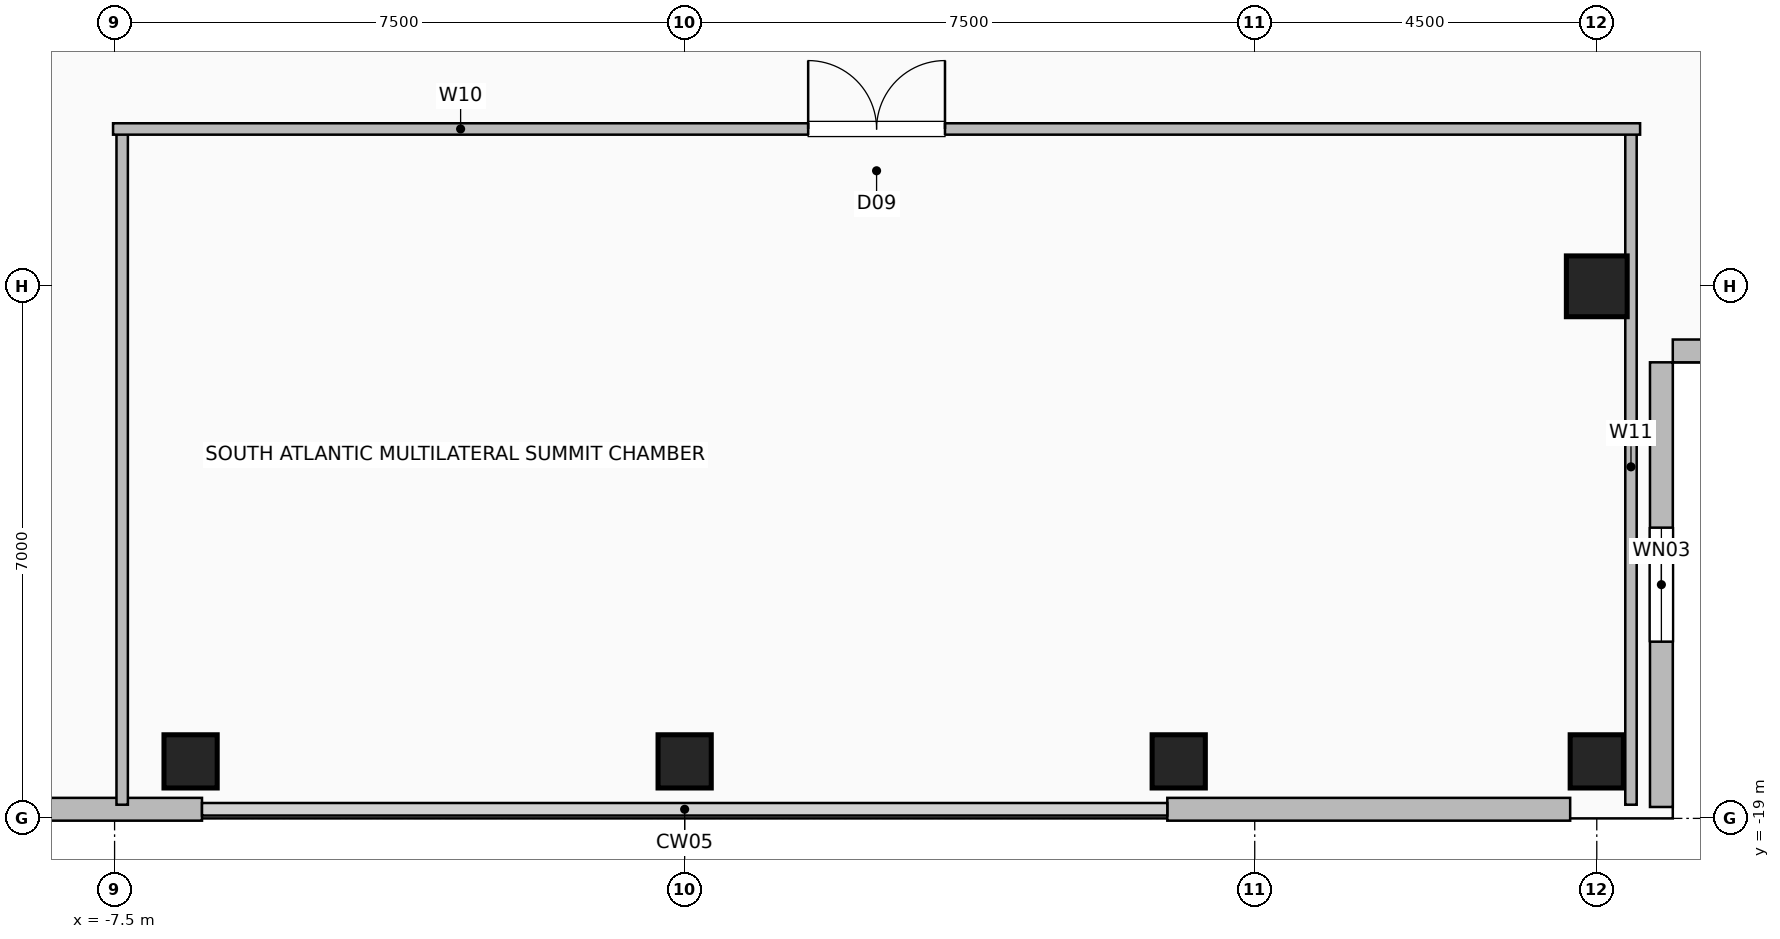
"""IFC4 building model, lengths in metres.
Left out: names, types, materials, properties, quantities, classifications, styles, units other than length and angle.
Written with IfcOpenShell. Run it as: python <this file> out.ifc"""

import sys

from ifc_helpers import new_model, si_unit, direction, frame, frame_2d, origin, origin_2d, place, context, subcontext, project, spatial, rectangle, hollow_rectangle, extrude, element, fill, save


model = new_model("IFC4")
c1 = context("Model", 3, precision=1e-05, world=origin(), true_north=direction((0.0, 1.0)))
c2 = subcontext(c1, "Body", "Model", "MODEL_VIEW")
j1 = project(units=[si_unit("LENGTHUNIT", "METRE"), si_unit("PLANEANGLEUNIT", "RADIAN")], contexts=[c1])
p1 = place(None, origin())
s1 = spatial("IfcSite", under=j1, at=p1, CompositionType="ELEMENT")
p2 = place(p1, origin())
s2 = spatial("IfcBuilding", under=s1, at=p2, CompositionType="ELEMENT")
p3 = place(p2, frame((0.0, 0.0, 246.8)))
s3 = spatial("IfcBuildingStorey", under=s2, at=p3, CompositionType="ELEMENT", Elevation=246.8)
for number, where, z_axis, x_axis in (
    (1, (-6.5, -18.25, 0.0), (0.0, 0.0, 1.0), (1.0, 0.0, 0.0)),
    (2, (0.0, -18.25, 0.0), (0.0, 0.0, 1.0), (1.0, 0.0, 0.0)),
    (3, (6.5, -18.25, 0.0), (0.0, 0.0, 1.0), (1.0, 0.0, 0.0)),
    (4, (12.0, -18.25, 0.0), (0.0, 0.0, 1.0), (1.0, 0.0, 0.0)),
):
    element("IfcColumn", number, at=place(p3, frame(where, z_axis=z_axis, x_axis=x_axis)), inside=s3, PredefinedType="COLUMN", context=c2, shape_type="SweptSolid", body=[
        extrude(hollow_rectangle(XDim=0.7, YDim=0.7, WallThickness=0.035, at=origin_2d()), origin(), (0.0, 0.0, 1.0), 3.6),
    ])
p4 = place(p3, frame((12.0, -12.0, 0.0), z_axis=(0.0, 0.0, 1.0), x_axis=(1.0, 0.0, 0.0)))
e5 = element("IfcColumn", 5, at=p4, inside=s3, PredefinedType="COLUMN", context=c2, shape_type="SweptSolid", body=[
    extrude(hollow_rectangle(XDim=0.8, YDim=0.8, WallThickness=0.04, at=origin_2d()), origin(), (0.0, 0.0, 1.0), 3.6),
])
for number, where, z_axis, x_axis in (
    (6, (-11.65, -18.88, 0.0), (0.0, 0.0, 1.0), (1.0, 0.0, 0.0)),
    (7, (6.35, -18.88, 0.0), (0.0, 0.0, 1.0), (1.0, 0.0, 0.0)),
):
    element("IfcWall", number, at=place(p3, frame(where, z_axis=z_axis, x_axis=x_axis)), inside=s3, PredefinedType="SOLIDWALL", context=c2, shape_type="SweptSolid", body=[
        extrude(rectangle(XDim=5.3, YDim=0.3, at=frame_2d((2.65, 0.0))), origin(), (0.0, 0.0, 1.0), 3.36),
    ])
p5 = place(p3, frame((12.85, -18.85, 0.0), z_axis=(0.0, 0.0, 1.0), x_axis=(0.0, 1.0, 0.0)))
e8 = element("IfcWall", 8, at=p5, inside=s3, PredefinedType="SOLIDWALL", context=c2, shape_type="SweptSolid", body=[
    extrude(rectangle(XDim=5.85, YDim=0.3, at=frame_2d((2.925, 0.0))), origin(), (0.0, 0.0, 1.0), 3.36),
])
p6 = place(p5, frame((2.175, 0.0, 0.9)))
e9 = element("IfcOpeningElement", 9, at=p6, cuts=e8, PredefinedType="OPENING", context=c2, shape_type="SweptSolid", body=[
    extrude(rectangle(XDim=1.5, YDim=1.8, at=frame_2d((0.75, 0.9))), frame((0.0, 0.16, 0.0), z_axis=(0.0, -1.0, 0.0), x_axis=(1.0, 0.0, 0.0)), (0.0, 0.0, 1.0), 0.32),
])
p7 = place(p3, frame((18.85, -12.85, 0.0), z_axis=(0.0, 0.0, 1.0), x_axis=(-1.0, 0.0, 0.0)))
e10 = element("IfcWall", 10, at=p7, inside=s3, PredefinedType="SOLIDWALL", context=c2, shape_type="SweptSolid", body=[
    extrude(rectangle(XDim=5.85, YDim=0.3, at=frame_2d((2.925, 0.0))), origin(), (0.0, 0.0, 1.0), 3.36),
])
for number, where, z_axis, x_axis in (
    (11, (-7.4, -18.82, 0.0), (0.0, 0.0, 1.0), (0.0, 1.0, 0.0)),
    (12, (12.45, -18.82, 0.0), (0.0, 0.0, 1.0), (0.0, 1.0, 0.0)),
):
    element("IfcWall", number, at=place(p3, frame(where, z_axis=z_axis, x_axis=x_axis)), inside=s3, PredefinedType="PARTITIONING", context=c2, shape_type="SweptSolid", body=[
        extrude(rectangle(XDim=8.89, YDim=0.15, at=frame_2d((4.445, 0.0))), origin(), (0.0, 0.0, 1.0), 3.36),
    ])
p8 = place(p3, frame((-7.52, -9.93, 0.0), z_axis=(0.0, 0.0, 1.0), x_axis=(1.0, 0.0, 0.0)))
e13 = element("IfcWall", 13, at=p8, inside=s3, PredefinedType="PARTITIONING", context=c2, shape_type="SweptSolid", body=[
    extrude(rectangle(XDim=20.09, YDim=0.15, at=frame_2d((10.045, 0.0))), origin(), (0.0, 0.0, 1.0), 3.36),
])
p9 = place(p8, frame((9.145, 0.0, 0.0)))
e14 = element("IfcOpeningElement", 14, at=p9, cuts=e13, PredefinedType="OPENING", context=c2, shape_type="SweptSolid", body=[
    extrude(rectangle(XDim=1.8, YDim=2.08, at=frame_2d((0.9, 1.04))), frame((0.0, 0.085, 0.0), z_axis=(0.0, -1.0, 0.0), x_axis=(1.0, 0.0, 0.0)), (0.0, 0.0, 1.0), 0.17),
])
p10 = place(p6, origin())
e15 = element("IfcWindow", 15, at=p10, inside=s3, PartitioningType="SINGLE_PANEL", PredefinedType="WINDOW", context=c2, shape_type="SweptSolid", body=[
    extrude(rectangle(XDim=1.5, YDim=1.8, at=frame_2d((0.75, 0.9))), frame((0.0, 0.03, 0.0), z_axis=(0.0, -1.0, 0.0), x_axis=(1.0, 0.0, 0.0)), (0.0, 0.0, 1.0), 0.06),
])
fill(e9, e15)
p11 = place(p9, origin())
e16 = element("IfcDoor", 16, at=p11, inside=s3, OperationType="DOUBLE_DOOR_SINGLE_SWING", PredefinedType="DOOR", context=c2, shape_type="SweptSolid", body=[
    extrude(rectangle(XDim=1.8, YDim=2.08, at=frame_2d((0.9, 1.04))), frame((0.0, 0.025, 0.0), z_axis=(0.0, -1.0, 0.0), x_axis=(1.0, 0.0, 0.0)), (0.0, 0.0, 1.0), 0.05),
])
fill(e14, e16)
save(model, sys.argv[1])
